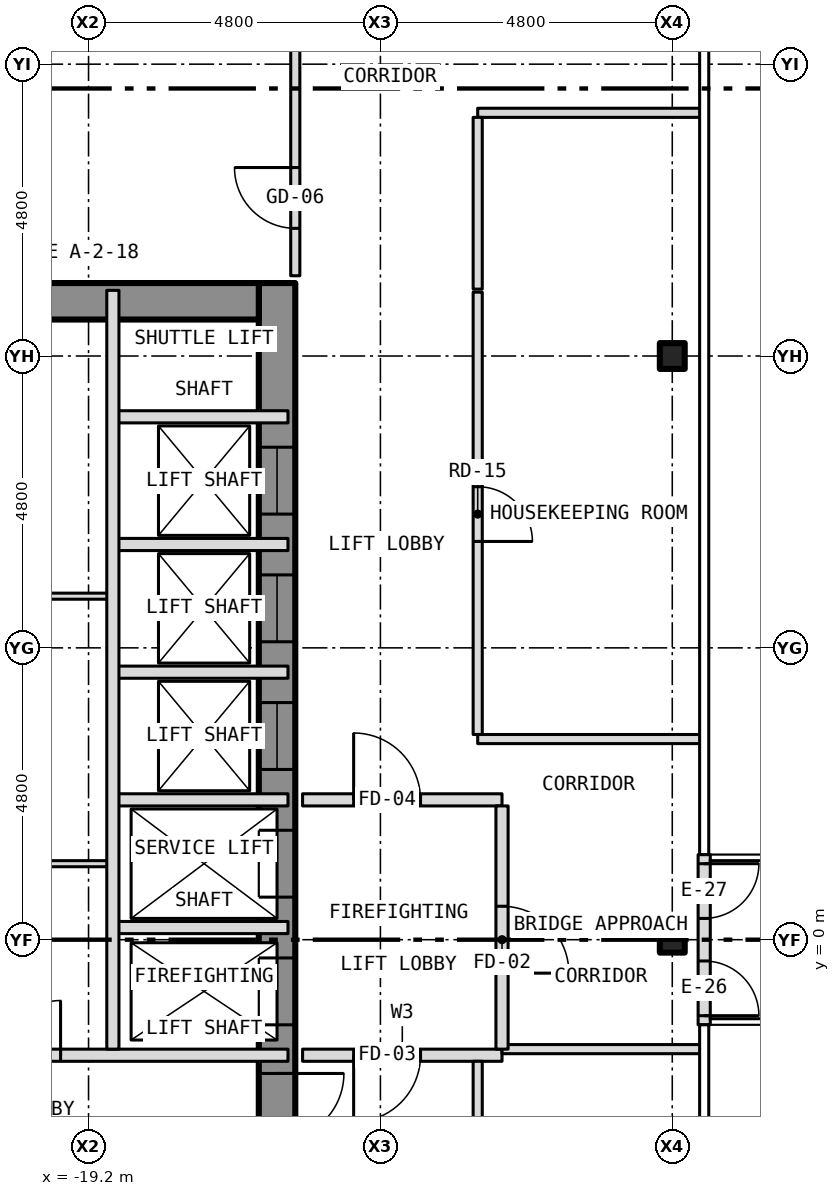
"""IFC4 building model, lengths in metres.
Left out: names, types, materials, properties, quantities, classifications, styles, units other than length and angle.
Written with IfcOpenShell. Run it as: python <this file> out.ifc"""

import sys

from ifc_helpers import new_model, si_unit, direction, frame, frame_2d, origin, origin_2d, place, context, subcontext, project, spatial, rectangle, i_section, extrude, element, fill, save


model = new_model("IFC4")
c1 = context("Model", 3, precision=1e-05, world=origin(), true_north=direction((0.0, 1.0)))
c2 = subcontext(c1, "Body", "Model", "MODEL_VIEW")
j1 = project(units=[si_unit("LENGTHUNIT", "METRE"), si_unit("PLANEANGLEUNIT", "RADIAN")], contexts=[c1])
p1 = place(None, origin())
s1 = spatial("IfcSite", under=j1, at=p1, CompositionType="ELEMENT")
p2 = place(p1, origin())
s2 = spatial("IfcBuilding", under=s1, at=p2, CompositionType="ELEMENT")
p3 = place(p2, frame((0.0, 0.0, 67.0)))
s3 = spatial("IfcBuildingStorey", under=s2, at=p3, CompositionType="ELEMENT", Elevation=67.0)
for number, where, z_axis, x_axis in (
    (1, (-9.6, 0.0, -0.15), (0.0, 0.0, 1.0), (1.0, 0.0, 0.0)),
    (2, (-9.6, 9.6, -0.15), (0.0, 0.0, 1.0), (1.0, 0.0, 0.0)),
):
    element("IfcColumn", number, at=place(p3, frame(where, z_axis=z_axis, x_axis=x_axis)), inside=s3, PredefinedType="COLUMN", context=c2, shape_type="SweptSolid", body=[
        extrude(i_section(OverallWidth=0.409, OverallDepth=0.424, WebThickness=0.033, FlangeThickness=0.052, at=origin_2d()), origin(), (0.0, 0.0, 1.0), 3.5),
    ])
p4 = place(p3, frame((-16.1, -10.8, 0.0), z_axis=(0.0, 0.0, 1.0), x_axis=(0.0, 1.0, 0.0)))
e3 = element("IfcWall", 3, at=p4, inside=s3, PredefinedType="SHEAR", context=c2, shape_type="SweptSolid", body=[
    extrude(rectangle(XDim=21.6, YDim=0.6, at=frame_2d((10.8, 0.0))), origin(), (0.0, 0.0, 1.0), 3.25),
])
p5 = place(p4, frame((9.4, 0.0, 0.0)))
e4 = element("IfcOpeningElement", 4, at=p5, cuts=e3, PredefinedType="OPENING", context=c2, shape_type="SweptSolid", body=[
    extrude(rectangle(XDim=1.1, YDim=2.1, at=frame_2d((0.55, 1.05))), frame((0.0, 0.312, 0.0), z_axis=(0.0, -1.0, 0.0), x_axis=(1.0, 0.0, 0.0)), (0.0, 0.0, 1.0), 0.624),
])
p6 = place(p4, frame((11.5, 0.0, 0.0)))
e5 = element("IfcOpeningElement", 5, at=p6, cuts=e3, PredefinedType="OPENING", context=c2, shape_type="SweptSolid", body=[
    extrude(rectangle(XDim=1.1, YDim=2.1, at=frame_2d((0.55, 1.05))), frame((0.0, 0.312, 0.0), z_axis=(0.0, -1.0, 0.0), x_axis=(1.0, 0.0, 0.0)), (0.0, 0.0, 1.0), 0.624),
])
p7 = place(p4, frame((13.6, 0.0, 0.0)))
e6 = element("IfcOpeningElement", 6, at=p7, cuts=e3, PredefinedType="OPENING", context=c2, shape_type="SweptSolid", body=[
    extrude(rectangle(XDim=1.1, YDim=2.1, at=frame_2d((0.55, 1.05))), frame((0.0, 0.312, 0.0), z_axis=(0.0, -1.0, 0.0), x_axis=(1.0, 0.0, 0.0)), (0.0, 0.0, 1.0), 0.624),
])
p8 = place(p4, frame((15.7, 0.0, 0.0)))
e7 = element("IfcOpeningElement", 7, at=p8, cuts=e3, PredefinedType="OPENING", context=c2, shape_type="SweptSolid", body=[
    extrude(rectangle(XDim=1.1, YDim=2.1, at=frame_2d((0.55, 1.05))), frame((0.0, 0.312, 0.0), z_axis=(0.0, -1.0, 0.0), x_axis=(1.0, 0.0, 0.0)), (0.0, 0.0, 1.0), 0.624),
])
p9 = place(p4, frame((17.8, 0.0, 0.0)))
e8 = element("IfcOpeningElement", 8, at=p9, cuts=e3, PredefinedType="OPENING", context=c2, shape_type="SweptSolid", body=[
    extrude(rectangle(XDim=1.1, YDim=2.1, at=frame_2d((0.55, 1.05))), frame((0.0, 0.312, 0.0), z_axis=(0.0, -1.0, 0.0), x_axis=(1.0, 0.0, 0.0)), (0.0, 0.0, 1.0), 0.624),
])
p10 = place(p4, frame((0.758, 0.0, 0.0)))
e9 = element("IfcOpeningElement", 9, at=p10, cuts=e3, PredefinedType="OPENING", context=c2, shape_type="SweptSolid", body=[
    extrude(rectangle(XDim=1.1, YDim=2.1, at=frame_2d((0.55, 1.05))), frame((0.0, 0.312, 0.0), z_axis=(0.0, -1.0, 0.0), x_axis=(1.0, 0.0, 0.0)), (0.0, 0.0, 1.0), 0.624),
])
p11 = place(p4, frame((7.5, 0.0, 0.0)))
e10 = element("IfcOpeningElement", 10, at=p11, cuts=e3, PredefinedType="OPENING", context=c2, shape_type="SweptSolid", body=[
    extrude(rectangle(XDim=1.1, YDim=2.1, at=frame_2d((0.55, 1.05))), frame((0.0, 0.312, 0.0), z_axis=(0.0, -1.0, 0.0), x_axis=(1.0, 0.0, 0.0)), (0.0, 0.0, 1.0), 0.624),
])
p12 = place(p3, frame((-23.4, 10.5, 0.0), z_axis=(0.0, 0.0, 1.0), x_axis=(1.0, 0.0, 0.0)))
e11 = element("IfcWall", 11, at=p12, inside=s3, PredefinedType="SHEAR", context=c2, shape_type="SweptSolid", body=[
    extrude(rectangle(XDim=7.0, YDim=0.6, at=frame_2d((3.5, 0.0))), origin(), (0.0, 0.0, 1.0), 3.25),
])
p13 = place(p3, frame((-9.075, -1.4, 0.0), z_axis=(0.0, 0.0, 1.0), x_axis=(0.0, 1.0, 0.0)))
e12 = element("IfcWall", 12, at=p13, inside=s3, PredefinedType="SOLIDWALL", context=c2, shape_type="SweptSolid", body=[
    extrude(rectangle(XDim=2.8, YDim=0.2, at=frame_2d((1.4, 0.0))), origin(), (0.0, 0.0, 1.0), 3.5),
])
p14 = place(p13, frame((0.15, 0.0, 0.0)))
e13 = element("IfcOpeningElement", 13, at=p14, cuts=e12, PredefinedType="OPENING", context=c2, shape_type="SweptSolid", body=[
    extrude(rectangle(XDim=0.9, YDim=2.1, at=frame_2d((0.45, 1.05))), frame((0.0, 0.112, 0.0), z_axis=(0.0, -1.0, 0.0), x_axis=(1.0, 0.0, 0.0)), (0.0, 0.0, 1.0), 0.224),
])
p15 = place(p13, frame((1.75, 0.0, 0.0)))
e14 = element("IfcOpeningElement", 14, at=p15, cuts=e12, PredefinedType="OPENING", context=c2, shape_type="SweptSolid", body=[
    extrude(rectangle(XDim=0.9, YDim=2.1, at=frame_2d((0.45, 1.05))), frame((0.0, 0.112, 0.0), z_axis=(0.0, -1.0, 0.0), x_axis=(1.0, 0.0, 0.0)), (0.0, 0.0, 1.0), 0.224),
])
p16 = place(p3, frame((-23.88, -1.9, 0.0), z_axis=(0.0, 0.0, 1.0), x_axis=(1.0, 0.0, 0.0)))
e15 = element("IfcWall", 15, at=p16, inside=s3, PredefinedType="PARTITIONING", context=c2, shape_type="SweptSolid", body=[
    extrude(rectangle(XDim=7.96, YDim=0.2, at=frame_2d((3.98, 0.0))), origin(), (0.0, 0.0, 1.0), 3.25),
])
p17 = place(p16, frame((3.32, 0.0, 0.0)))
e16 = element("IfcOpeningElement", 16, at=p17, cuts=e15, PredefinedType="OPENING", context=c2, shape_type="SweptSolid", body=[
    extrude(rectangle(XDim=0.9, YDim=2.1, at=frame_2d((0.45, 1.05))), frame((0.0, 0.112, 0.0), z_axis=(0.0, -1.0, 0.0), x_axis=(1.0, 0.0, 0.0)), (0.0, 0.0, 1.0), 0.224),
])
p18 = place(p3, frame((-15.68, -1.9, 0.0), z_axis=(0.0, 0.0, 1.0), x_axis=(1.0, 0.0, 0.0)))
e17 = element("IfcWall", 17, at=p18, inside=s3, PredefinedType="PARTITIONING", context=c2, shape_type="SweptSolid", body=[
    extrude(rectangle(XDim=3.28, YDim=0.2, at=frame_2d((1.64, 0.0))), origin(), (0.0, 0.0, 1.0), 3.35),
])
p19 = place(p18, frame((0.84, 0.0, 0.0)))
e18 = element("IfcOpeningElement", 18, at=p19, cuts=e17, PredefinedType="OPENING", context=c2, shape_type="SweptSolid", body=[
    extrude(rectangle(XDim=1.1, YDim=2.1, at=frame_2d((0.55, 1.05))), frame((0.0, 0.112, 0.0), z_axis=(0.0, -1.0, 0.0), x_axis=(1.0, 0.0, 0.0)), (0.0, 0.0, 1.0), 0.224),
])
p20 = place(p3, frame((-12.4, -1.8, 0.0), z_axis=(0.0, 0.0, 1.0), x_axis=(1.0, 0.0, 0.0)))
e19 = element("IfcWall", 19, at=p20, inside=s3, PredefinedType="PARTITIONING", context=c2, shape_type="SweptSolid", body=[
    extrude(rectangle(XDim=3.28, YDim=0.15, at=frame_2d((1.64, 0.0))), origin(), (0.0, 0.0, 1.0), 3.35),
])
p21 = place(p3, frame((-18.8, 0.2, 0.0), z_axis=(0.0, 0.0, 1.0), x_axis=(1.0, 0.0, 0.0)))
e20 = element("IfcWall", 20, at=p21, inside=s3, PredefinedType="PARTITIONING", context=c2, shape_type="SweptSolid", body=[
    extrude(rectangle(XDim=2.88, YDim=0.2, at=frame_2d((1.44, 0.0))), origin(), (0.0, 0.0, 1.0), 3.25),
])
p22 = place(p3, frame((-23.88, 1.25, 0.0), z_axis=(0.0, 0.0, 1.0), x_axis=(1.0, 0.0, 0.0)))
e21 = element("IfcWall", 21, at=p22, inside=s3, PredefinedType="PARTITIONING", context=c2, shape_type="SweptSolid", body=[
    extrude(rectangle(XDim=5.08, YDim=0.1, at=frame_2d((2.54, 0.0))), origin(), (0.0, 0.0, 1.0), 3.25),
])
p23 = place(p22, frame((2.03, 0.0, 0.0)))
e22 = element("IfcOpeningElement", 22, at=p23, cuts=e21, PredefinedType="OPENING", context=c2, shape_type="SweptSolid", body=[
    extrude(rectangle(XDim=0.9, YDim=2.1, at=frame_2d((0.45, 1.05))), frame((0.0, 0.062, 0.0), z_axis=(0.0, -1.0, 0.0), x_axis=(1.0, 0.0, 0.0)), (0.0, 0.0, 1.0), 0.124),
])
p24 = place(p3, frame((-18.8, 2.3, 0.0), z_axis=(0.0, 0.0, 1.0), x_axis=(1.0, 0.0, 0.0)))
e23 = element("IfcWall", 23, at=p24, inside=s3, PredefinedType="PARTITIONING", context=c2, shape_type="SweptSolid", body=[
    extrude(rectangle(XDim=2.88, YDim=0.2, at=frame_2d((1.44, 0.0))), origin(), (0.0, 0.0, 1.0), 3.25),
])
p25 = place(p3, frame((-15.68, 2.3, 0.0), z_axis=(0.0, 0.0, 1.0), x_axis=(1.0, 0.0, 0.0)))
e24 = element("IfcWall", 24, at=p25, inside=s3, PredefinedType="PARTITIONING", context=c2, shape_type="SweptSolid", body=[
    extrude(rectangle(XDim=3.28, YDim=0.2, at=frame_2d((1.64, 0.0))), origin(), (0.0, 0.0, 1.0), 3.35),
])
p26 = place(p25, frame((0.84, 0.0, 0.0)))
e25 = element("IfcOpeningElement", 25, at=p26, cuts=e24, PredefinedType="OPENING", context=c2, shape_type="SweptSolid", body=[
    extrude(rectangle(XDim=1.1, YDim=2.1, at=frame_2d((0.55, 1.05))), frame((0.0, 0.112, 0.0), z_axis=(0.0, -1.0, 0.0), x_axis=(1.0, 0.0, 0.0)), (0.0, 0.0, 1.0), 0.224),
])
p27 = place(p3, frame((-12.8, 3.3, 0.0), z_axis=(0.0, 0.0, 1.0), x_axis=(1.0, 0.0, 0.0)))
e26 = element("IfcWall", 26, at=p27, inside=s3, PredefinedType="PARTITIONING", context=c2, shape_type="SweptSolid", body=[
    extrude(rectangle(XDim=3.68, YDim=0.15, at=frame_2d((1.84, 0.0))), origin(), (0.0, 0.0, 1.0), 3.35),
])
p28 = place(p3, frame((-18.8, 4.4, 0.0), z_axis=(0.0, 0.0, 1.0), x_axis=(1.0, 0.0, 0.0)))
e27 = element("IfcWall", 27, at=p28, inside=s3, PredefinedType="PARTITIONING", context=c2, shape_type="SweptSolid", body=[
    extrude(rectangle(XDim=2.88, YDim=0.2, at=frame_2d((1.44, 0.0))), origin(), (0.0, 0.0, 1.0), 3.25),
])
p29 = place(p3, frame((-23.88, 5.65, 0.0), z_axis=(0.0, 0.0, 1.0), x_axis=(1.0, 0.0, 0.0)))
e28 = element("IfcWall", 28, at=p29, inside=s3, PredefinedType="PARTITIONING", context=c2, shape_type="SweptSolid", body=[
    extrude(rectangle(XDim=5.08, YDim=0.1, at=frame_2d((2.54, 0.0))), origin(), (0.0, 0.0, 1.0), 3.25),
])
p30 = place(p29, frame((2.03, 0.0, 0.0)))
e29 = element("IfcOpeningElement", 29, at=p30, cuts=e28, PredefinedType="OPENING", context=c2, shape_type="SweptSolid", body=[
    extrude(rectangle(XDim=0.9, YDim=2.1, at=frame_2d((0.45, 1.05))), frame((0.0, 0.062, 0.0), z_axis=(0.0, -1.0, 0.0), x_axis=(1.0, 0.0, 0.0)), (0.0, 0.0, 1.0), 0.124),
])
for number, where, z_axis, x_axis in (
    (30, (-18.8, 6.5, 0.0), (0.0, 0.0, 1.0), (1.0, 0.0, 0.0)),
    (31, (-18.8, 8.6, 0.0), (0.0, 0.0, 1.0), (1.0, 0.0, 0.0)),
):
    element("IfcWall", number, at=place(p3, frame(where, z_axis=z_axis, x_axis=x_axis)), inside=s3, PredefinedType="PARTITIONING", context=c2, shape_type="SweptSolid", body=[
        extrude(rectangle(XDim=2.88, YDim=0.2, at=frame_2d((1.44, 0.0))), origin(), (0.0, 0.0, 1.0), 3.25),
    ])
p31 = place(p3, frame((-12.8, 13.6, 0.0), z_axis=(0.0, 0.0, 1.0), x_axis=(1.0, 0.0, 0.0)))
e32 = element("IfcWall", 32, at=p31, inside=s3, PredefinedType="PARTITIONING", context=c2, shape_type="SweptSolid", body=[
    extrude(rectangle(XDim=3.68, YDim=0.15, at=frame_2d((1.84, 0.0))), origin(), (0.0, 0.0, 1.0), 3.35),
])
p32 = place(p3, frame((-18.8, -1.8, 0.0), z_axis=(0.0, 0.0, 1.0), x_axis=(0.0, 1.0, 0.0)))
e33 = element("IfcWall", 33, at=p32, inside=s3, PredefinedType="PARTITIONING", context=c2, shape_type="SweptSolid", body=[
    extrude(rectangle(XDim=12.48, YDim=0.2, at=frame_2d((6.24, 0.0))), origin(), (0.0, 0.0, 1.0), 3.25),
])
p33 = place(p3, frame((-15.8, 10.92, 0.0), z_axis=(0.0, 0.0, 1.0), x_axis=(0.0, 1.0, 0.0)))
e34 = element("IfcWall", 34, at=p33, inside=s3, PredefinedType="PARTITIONING", context=c2, shape_type="SweptSolid", body=[
    extrude(rectangle(XDim=4.805, YDim=0.15, at=frame_2d((2.403, 0.0))), origin(), (0.0, 0.0, 1.0), 3.35),
])
p34 = place(p33, frame((0.78, 0.0, 0.0)))
e35 = element("IfcOpeningElement", 35, at=p34, cuts=e34, PredefinedType="OPENING", context=c2, shape_type="SweptSolid", body=[
    extrude(rectangle(XDim=1.0, YDim=2.1, at=frame_2d((0.5, 1.05))), frame((0.0, 0.087, 0.0), z_axis=(0.0, -1.0, 0.0), x_axis=(1.0, 0.0, 0.0)), (0.0, 0.0, 1.0), 0.174),
])
p35 = place(p3, frame((-12.8, -13.525, 0.0), z_axis=(0.0, 0.0, 1.0), x_axis=(0.0, 1.0, 0.0)))
e36 = element("IfcWall", 36, at=p35, inside=s3, PredefinedType="PARTITIONING", context=c2, shape_type="SweptSolid", body=[
    extrude(rectangle(XDim=11.525, YDim=0.15, at=frame_2d((5.762, 0.0))), origin(), (0.0, 0.0, 1.0), 3.35),
])
p36 = place(p35, frame((6.725, 0.0, 0.0)))
e37 = element("IfcOpeningElement", 37, at=p36, cuts=e36, PredefinedType="OPENING", context=c2, shape_type="SweptSolid", body=[
    extrude(rectangle(XDim=0.9, YDim=2.1, at=frame_2d((0.45, 1.05))), frame((0.0, 0.087, 0.0), z_axis=(0.0, -1.0, 0.0), x_axis=(1.0, 0.0, 0.0)), (0.0, 0.0, 1.0), 0.174),
])
p37 = place(p3, frame((-12.8, 3.375, 0.0), z_axis=(0.0, 0.0, 1.0), x_axis=(0.0, 1.0, 0.0)))
e38 = element("IfcWall", 38, at=p37, inside=s3, PredefinedType="PARTITIONING", context=c2, shape_type="SweptSolid", body=[
    extrude(rectangle(XDim=7.275, YDim=0.15, at=frame_2d((3.637, 0.0))), origin(), (0.0, 0.0, 1.0), 3.35),
])
p38 = place(p37, frame((3.175, 0.0, 0.0)))
e39 = element("IfcOpeningElement", 39, at=p38, cuts=e38, PredefinedType="OPENING", context=c2, shape_type="SweptSolid", body=[
    extrude(rectangle(XDim=0.9, YDim=2.1, at=frame_2d((0.45, 1.05))), frame((0.0, 0.087, 0.0), z_axis=(0.0, -1.0, 0.0), x_axis=(1.0, 0.0, 0.0)), (0.0, 0.0, 1.0), 0.174),
])
p39 = place(p3, frame((-12.8, 10.7, 0.0), z_axis=(0.0, 0.0, 1.0), x_axis=(0.0, 1.0, 0.0)))
e40 = element("IfcWall", 40, at=p39, inside=s3, PredefinedType="PARTITIONING", context=c2, shape_type="SweptSolid", body=[
    extrude(rectangle(XDim=2.825, YDim=0.15, at=frame_2d((1.413, 0.0))), origin(), (0.0, 0.0, 1.0), 3.35),
])
p40 = place(p3, frame((-12.4, -1.8, 0.0), z_axis=(0.0, 0.0, 1.0), x_axis=(0.0, 1.0, 0.0)))
e41 = element("IfcWall", 41, at=p40, inside=s3, PredefinedType="PARTITIONING", context=c2, shape_type="SweptSolid", body=[
    extrude(rectangle(XDim=4.0, YDim=0.2, at=frame_2d((2.0, 0.0))), origin(), (0.0, 0.0, 1.0), 3.35),
])
p41 = place(p40, frame((1.25, 0.0, 0.0)))
e42 = element("IfcOpeningElement", 42, at=p41, cuts=e41, PredefinedType="OPENING", context=c2, shape_type="SweptSolid", body=[
    extrude(rectangle(XDim=1.1, YDim=2.1, at=frame_2d((0.55, 1.05))), frame((0.0, 0.112, 0.0), z_axis=(0.0, -1.0, 0.0), x_axis=(1.0, 0.0, 0.0)), (0.0, 0.0, 1.0), 0.224),
])
p42 = place(p14, origin())
e43 = element("IfcDoor", 43, at=p42, inside=s3, OperationType="SINGLE_SWING_LEFT", PredefinedType="DOOR", context=c2, shape_type="SweptSolid", body=[
    extrude(rectangle(XDim=0.9, YDim=2.1, at=frame_2d((0.45, 1.05))), frame((0.0, 0.025, 0.0), z_axis=(0.0, -1.0, 0.0), x_axis=(1.0, 0.0, 0.0)), (0.0, 0.0, 1.0), 0.05),
])
fill(e13, e43)
p43 = place(p15, origin())
e44 = element("IfcDoor", 44, at=p43, inside=s3, OperationType="SINGLE_SWING_RIGHT", PredefinedType="DOOR", context=c2, shape_type="SweptSolid", body=[
    extrude(rectangle(XDim=0.9, YDim=2.1, at=frame_2d((0.45, 1.05))), frame((0.0, 0.025, 0.0), z_axis=(0.0, -1.0, 0.0), x_axis=(1.0, 0.0, 0.0)), (0.0, 0.0, 1.0), 0.05),
])
fill(e14, e44)
p44 = place(p5, origin())
e45 = element("IfcDoor", 45, at=p44, inside=s3, OperationType="SLIDING_TO_LEFT", PredefinedType="DOOR", context=c2, shape_type="SweptSolid", body=[
    extrude(rectangle(XDim=1.1, YDim=2.1, at=frame_2d((0.55, 1.05))), frame((0.0, 0.025, 0.0), z_axis=(0.0, -1.0, 0.0), x_axis=(1.0, 0.0, 0.0)), (0.0, 0.0, 1.0), 0.05),
])
fill(e4, e45)
p45 = place(p6, origin())
e46 = element("IfcDoor", 46, at=p45, inside=s3, OperationType="SLIDING_TO_LEFT", PredefinedType="DOOR", context=c2, shape_type="SweptSolid", body=[
    extrude(rectangle(XDim=1.1, YDim=2.1, at=frame_2d((0.55, 1.05))), frame((0.0, 0.025, 0.0), z_axis=(0.0, -1.0, 0.0), x_axis=(1.0, 0.0, 0.0)), (0.0, 0.0, 1.0), 0.05),
])
fill(e5, e46)
p46 = place(p7, origin())
e47 = element("IfcDoor", 47, at=p46, inside=s3, OperationType="SLIDING_TO_LEFT", PredefinedType="DOOR", context=c2, shape_type="SweptSolid", body=[
    extrude(rectangle(XDim=1.1, YDim=2.1, at=frame_2d((0.55, 1.05))), frame((0.0, 0.025, 0.0), z_axis=(0.0, -1.0, 0.0), x_axis=(1.0, 0.0, 0.0)), (0.0, 0.0, 1.0), 0.05),
])
fill(e6, e47)
p47 = place(p8, origin())
e48 = element("IfcDoor", 48, at=p47, inside=s3, OperationType="SLIDING_TO_LEFT", PredefinedType="DOOR", context=c2, shape_type="SweptSolid", body=[
    extrude(rectangle(XDim=1.1, YDim=2.1, at=frame_2d((0.55, 1.05))), frame((0.0, 0.025, 0.0), z_axis=(0.0, -1.0, 0.0), x_axis=(1.0, 0.0, 0.0)), (0.0, 0.0, 1.0), 0.05),
])
fill(e7, e48)
p48 = place(p9, origin())
e49 = element("IfcDoor", 49, at=p48, inside=s3, OperationType="SLIDING_TO_LEFT", PredefinedType="DOOR", context=c2, shape_type="SweptSolid", body=[
    extrude(rectangle(XDim=1.1, YDim=2.1, at=frame_2d((0.55, 1.05))), frame((0.0, 0.025, 0.0), z_axis=(0.0, -1.0, 0.0), x_axis=(1.0, 0.0, 0.0)), (0.0, 0.0, 1.0), 0.05),
])
fill(e8, e49)
p49 = place(p11, origin())
e50 = element("IfcDoor", 50, at=p49, inside=s3, OperationType="SINGLE_SWING_RIGHT", PredefinedType="DOOR", context=c2, shape_type="SweptSolid", body=[
    extrude(rectangle(XDim=1.1, YDim=2.1, at=frame_2d((0.55, 1.05))), frame((0.0, 0.025, 0.0), z_axis=(0.0, -1.0, 0.0), x_axis=(1.0, 0.0, 0.0)), (0.0, 0.0, 1.0), 0.05),
])
fill(e10, e50)
p50 = place(p17, origin())
e51 = element("IfcDoor", 51, at=p50, inside=s3, OperationType="SINGLE_SWING_RIGHT", PredefinedType="DOOR", context=c2, shape_type="SweptSolid", body=[
    extrude(rectangle(XDim=0.9, YDim=2.1, at=frame_2d((0.45, 1.05))), frame((0.0, 0.025, 0.0), z_axis=(0.0, -1.0, 0.0), x_axis=(1.0, 0.0, 0.0)), (0.0, 0.0, 1.0), 0.05),
])
fill(e16, e51)
p51 = place(p41, origin())
e52 = element("IfcDoor", 52, at=p51, inside=s3, OperationType="SINGLE_SWING_LEFT", PredefinedType="DOOR", context=c2, shape_type="SweptSolid", body=[
    extrude(rectangle(XDim=1.1, YDim=2.1, at=frame_2d((0.55, 1.05))), frame((0.0, 0.025, 0.0), z_axis=(0.0, -1.0, 0.0), x_axis=(1.0, 0.0, 0.0)), (0.0, 0.0, 1.0), 0.05),
])
fill(e42, e52)
p52 = place(p19, origin())
e53 = element("IfcDoor", 53, at=p52, inside=s3, OperationType="SINGLE_SWING_LEFT", PredefinedType="DOOR", context=c2, shape_type="SweptSolid", body=[
    extrude(rectangle(XDim=1.1, YDim=2.1, at=frame_2d((0.55, 1.05))), frame((0.0, 0.025, 0.0), z_axis=(0.0, -1.0, 0.0), x_axis=(1.0, 0.0, 0.0)), (0.0, 0.0, 1.0), 0.05),
])
fill(e18, e53)
p53 = place(p26, origin())
e54 = element("IfcDoor", 54, at=p53, inside=s3, OperationType="SINGLE_SWING_LEFT", PredefinedType="DOOR", context=c2, shape_type="SweptSolid", body=[
    extrude(rectangle(XDim=1.1, YDim=2.1, at=frame_2d((0.55, 1.05))), frame((0.0, 0.025, 0.0), z_axis=(0.0, -1.0, 0.0), x_axis=(1.0, 0.0, 0.0)), (0.0, 0.0, 1.0), 0.05),
])
fill(e25, e54)
p54 = place(p34, origin())
e55 = element("IfcDoor", 55, at=p54, inside=s3, OperationType="SINGLE_SWING_RIGHT", PredefinedType="DOOR", context=c2, shape_type="SweptSolid", body=[
    extrude(rectangle(XDim=1.0, YDim=2.1, at=frame_2d((0.5, 1.05))), frame((0.0, 0.025, 0.0), z_axis=(0.0, -1.0, 0.0), x_axis=(1.0, 0.0, 0.0)), (0.0, 0.0, 1.0), 0.05),
])
fill(e35, e55)
p55 = place(p38, origin())
e56 = element("IfcDoor", 56, at=p55, inside=s3, OperationType="SINGLE_SWING_LEFT", PredefinedType="DOOR", context=c2, shape_type="SweptSolid", body=[
    extrude(rectangle(XDim=0.9, YDim=2.1, at=frame_2d((0.45, 1.05))), frame((0.0, 0.025, 0.0), z_axis=(0.0, -1.0, 0.0), x_axis=(1.0, 0.0, 0.0)), (0.0, 0.0, 1.0), 0.05),
])
fill(e39, e56)
save(model, sys.argv[1])
